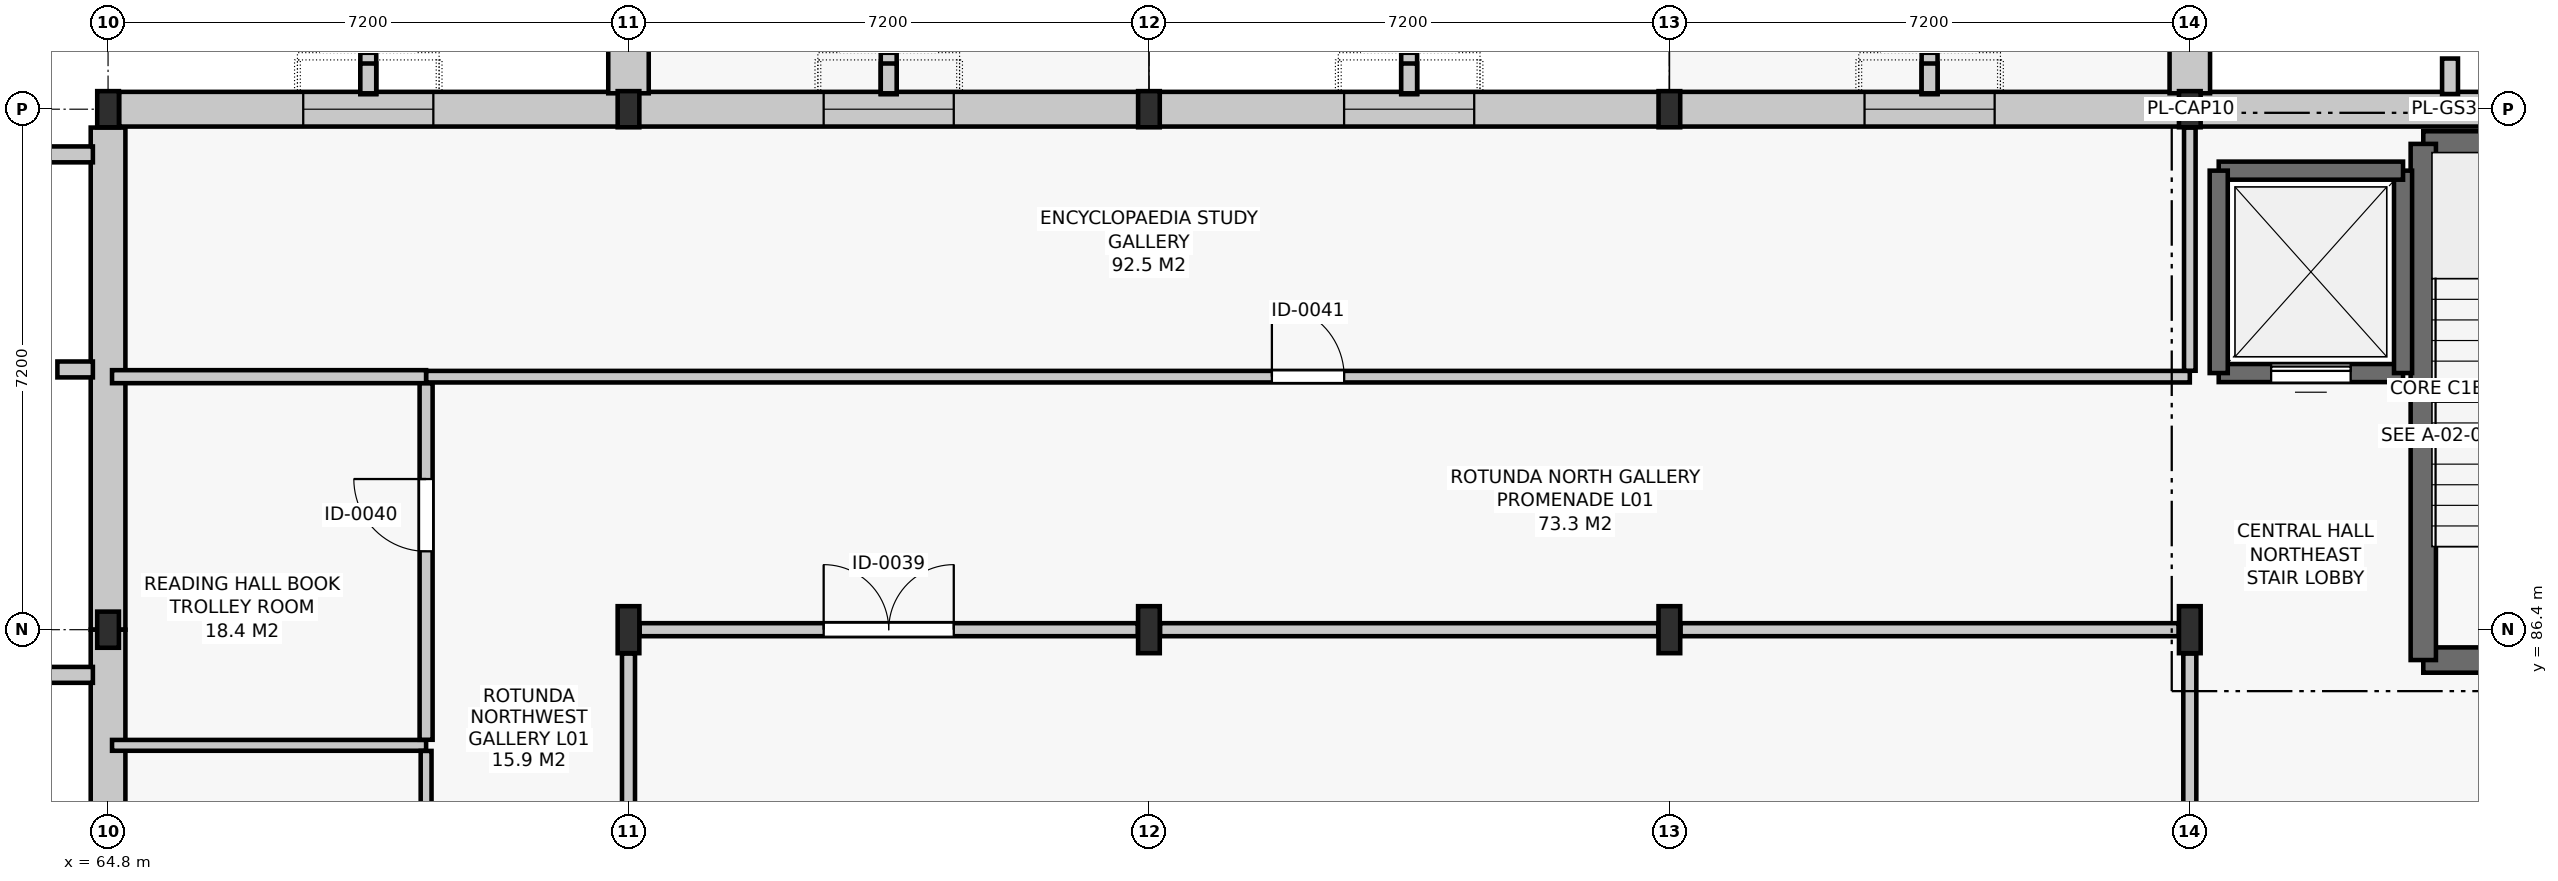
"""IFC4 building model, lengths in metres.
Left out: names, types, materials, properties, quantities, classifications, styles, units other than length and angle.
Written with IfcOpenShell. Run it as: python <this file> out.ifc"""

import sys

from ifc_helpers import new_model, si_unit, direction, frame, frame_2d, origin, origin_2d, place, context, subcontext, project, spatial, rectangle, i_section, extrude, element, fill, save


model = new_model("IFC4")
c1 = context("Model", 3, precision=1e-05, world=origin(), true_north=direction((0.0, 1.0)))
c2 = subcontext(c1, "Body", "Model", "MODEL_VIEW")
j1 = project(units=[si_unit("LENGTHUNIT", "METRE"), si_unit("PLANEANGLEUNIT", "RADIAN")], contexts=[c1])
p1 = place(None, origin())
s1 = spatial("IfcSite", under=j1, at=p1, CompositionType="ELEMENT")
p2 = place(p1, origin())
s2 = spatial("IfcBuilding", under=s1, at=p2, CompositionType="ELEMENT")
p3 = place(p2, frame((0.0, 0.0, 5.4)))
s3 = spatial("IfcBuildingStorey", under=s2, at=p3, CompositionType="ELEMENT", Elevation=5.4)
for number, where, z_axis, x_axis in (
    (1, (64.8, 86.4, 0.0), (0.0, 0.0, 1.0), (1.0, 0.0, 0.0)),
    (2, (64.8, 93.6, 0.0), (0.0, 0.0, 1.0), (1.0, 0.0, 0.0)),
):
    element("IfcColumn", number, at=place(p3, frame(where, z_axis=z_axis, x_axis=x_axis)), inside=s3, PredefinedType="COLUMN", context=c2, shape_type="SweptSolid", body=[
        extrude(i_section(OverallWidth=0.3, OverallDepth=0.5, WebThickness=0.014, FlangeThickness=0.028, FilletRadius=0.027, at=origin_2d()), origin(), (0.0, 0.0, 1.0), 4.8),
    ])
p4 = place(p3, frame((72.0, 86.4, 0.0), z_axis=(0.0, 0.0, 1.0), x_axis=(1.0, 0.0, 0.0)))
e3 = element("IfcColumn", 3, at=p4, inside=s3, PredefinedType="COLUMN", context=c2, shape_type="SweptSolid", body=[
    extrude(i_section(OverallWidth=0.3, OverallDepth=0.65, WebThickness=0.016, FlangeThickness=0.031, FilletRadius=0.027, at=origin_2d()), origin(), (0.0, 0.0, 1.0), 4.8),
])
p5 = place(p3, frame((72.0, 93.6, 0.0), z_axis=(0.0, 0.0, 1.0), x_axis=(1.0, 0.0, 0.0)))
e4 = element("IfcColumn", 4, at=p5, inside=s3, PredefinedType="COLUMN", context=c2, shape_type="SweptSolid", body=[
    extrude(i_section(OverallWidth=0.3, OverallDepth=0.5, WebThickness=0.014, FlangeThickness=0.028, FilletRadius=0.027, at=origin_2d()), origin(), (0.0, 0.0, 1.0), 4.8),
])
p6 = place(p3, frame((79.2, 86.4, 0.0), z_axis=(0.0, 0.0, 1.0), x_axis=(1.0, 0.0, 0.0)))
e5 = element("IfcColumn", 5, at=p6, inside=s3, PredefinedType="COLUMN", context=c2, shape_type="SweptSolid", body=[
    extrude(i_section(OverallWidth=0.3, OverallDepth=0.65, WebThickness=0.016, FlangeThickness=0.031, FilletRadius=0.027, at=origin_2d()), origin(), (0.0, 0.0, 1.0), 4.8),
])
p7 = place(p3, frame((79.2, 93.6, 0.0), z_axis=(0.0, 0.0, 1.0), x_axis=(1.0, 0.0, 0.0)))
e6 = element("IfcColumn", 6, at=p7, inside=s3, PredefinedType="COLUMN", context=c2, shape_type="SweptSolid", body=[
    extrude(i_section(OverallWidth=0.3, OverallDepth=0.5, WebThickness=0.014, FlangeThickness=0.028, FilletRadius=0.027, at=origin_2d()), origin(), (0.0, 0.0, 1.0), 4.8),
])
p8 = place(p3, frame((86.4, 86.4, 0.0), z_axis=(0.0, 0.0, 1.0), x_axis=(1.0, 0.0, 0.0)))
e7 = element("IfcColumn", 7, at=p8, inside=s3, PredefinedType="COLUMN", context=c2, shape_type="SweptSolid", body=[
    extrude(i_section(OverallWidth=0.3, OverallDepth=0.65, WebThickness=0.016, FlangeThickness=0.031, FilletRadius=0.027, at=origin_2d()), origin(), (0.0, 0.0, 1.0), 4.8),
])
p9 = place(p3, frame((86.4, 93.6, 0.0), z_axis=(0.0, 0.0, 1.0), x_axis=(1.0, 0.0, 0.0)))
e8 = element("IfcColumn", 8, at=p9, inside=s3, PredefinedType="COLUMN", context=c2, shape_type="SweptSolid", body=[
    extrude(i_section(OverallWidth=0.3, OverallDepth=0.5, WebThickness=0.014, FlangeThickness=0.028, FilletRadius=0.027, at=origin_2d()), origin(), (0.0, 0.0, 1.0), 4.8),
])
p10 = place(p3, frame((93.6, 86.4, 0.0), z_axis=(0.0, 0.0, 1.0), x_axis=(1.0, 0.0, 0.0)))
e9 = element("IfcColumn", 9, at=p10, inside=s3, PredefinedType="COLUMN", context=c2, shape_type="SweptSolid", body=[
    extrude(i_section(OverallWidth=0.3, OverallDepth=0.65, WebThickness=0.016, FlangeThickness=0.031, FilletRadius=0.027, at=origin_2d()), origin(), (0.0, 0.0, 1.0), 4.8),
])
p11 = place(p3, frame((93.6, 93.6, 0.0), z_axis=(0.0, 0.0, 1.0), x_axis=(1.0, 0.0, 0.0)))
e10 = element("IfcColumn", 10, at=p11, inside=s3, PredefinedType="COLUMN", context=c2, shape_type="SweptSolid", body=[
    extrude(i_section(OverallWidth=0.3, OverallDepth=0.5, WebThickness=0.014, FlangeThickness=0.028, FilletRadius=0.027, at=origin_2d()), origin(), (0.0, 0.0, 1.0), 4.8),
])
p12 = place(p3, frame((100.646, 93.6, 0.0), z_axis=(0.0, 0.0, 1.0), x_axis=(-1.0, 0.0, 0.0)))
e11 = element("IfcWall", 11, at=p12, inside=s3, PredefinedType="SOLIDWALL", context=c2, shape_type="SweptSolid", body=[
    extrude(rectangle(XDim=7.046, YDim=0.48, at=frame_2d((3.523, 0.0))), origin(), (0.0, 0.0, 1.0), 3.8),
])
p13 = place(p3, frame((93.6, 93.6, 0.0), z_axis=(0.0, 0.0, 1.0), x_axis=(-1.0, 0.0, 0.0)))
e12 = element("IfcWall", 12, at=p13, inside=s3, PredefinedType="SOLIDWALL", context=c2, shape_type="SweptSolid", body=[
    extrude(rectangle(XDim=7.2, YDim=0.48, at=frame_2d((3.6, 0.0))), origin(), (0.0, 0.0, 1.0), 3.8),
])
p14 = place(p13, frame((2.7, 0.0, 0.9)))
e13 = element("IfcOpeningElement", 13, at=p14, cuts=e12, PredefinedType="OPENING", context=c2, shape_type="SweptSolid", body=[
    extrude(rectangle(XDim=1.8, YDim=2.45, at=frame_2d((0.9, 1.225))), frame((0.0, 0.252, 0.0), z_axis=(0.0, -1.0, 0.0), x_axis=(1.0, 0.0, 0.0)), (0.0, 0.0, 1.0), 0.504),
])
p15 = place(p3, frame((86.4, 93.6, 0.0), z_axis=(0.0, 0.0, 1.0), x_axis=(-1.0, 0.0, 0.0)))
e14 = element("IfcWall", 14, at=p15, inside=s3, PredefinedType="SOLIDWALL", context=c2, shape_type="SweptSolid", body=[
    extrude(rectangle(XDim=7.2, YDim=0.48, at=frame_2d((3.6, 0.0))), origin(), (0.0, 0.0, 1.0), 3.8),
])
p16 = place(p15, frame((2.7, 0.0, 0.9)))
e15 = element("IfcOpeningElement", 15, at=p16, cuts=e14, PredefinedType="OPENING", context=c2, shape_type="SweptSolid", body=[
    extrude(rectangle(XDim=1.8, YDim=2.45, at=frame_2d((0.9, 1.225))), frame((0.0, 0.252, 0.0), z_axis=(0.0, -1.0, 0.0), x_axis=(1.0, 0.0, 0.0)), (0.0, 0.0, 1.0), 0.504),
])
p17 = place(p3, frame((79.2, 93.6, 0.0), z_axis=(0.0, 0.0, 1.0), x_axis=(-1.0, 0.0, 0.0)))
e16 = element("IfcWall", 16, at=p17, inside=s3, PredefinedType="SOLIDWALL", context=c2, shape_type="SweptSolid", body=[
    extrude(rectangle(XDim=7.2, YDim=0.48, at=frame_2d((3.6, 0.0))), origin(), (0.0, 0.0, 1.0), 3.8),
])
p18 = place(p17, frame((2.7, 0.0, 0.9)))
e17 = element("IfcOpeningElement", 17, at=p18, cuts=e16, PredefinedType="OPENING", context=c2, shape_type="SweptSolid", body=[
    extrude(rectangle(XDim=1.8, YDim=2.45, at=frame_2d((0.9, 1.225))), frame((0.0, 0.252, 0.0), z_axis=(0.0, -1.0, 0.0), x_axis=(1.0, 0.0, 0.0)), (0.0, 0.0, 1.0), 0.504),
])
p19 = place(p3, frame((72.0, 93.6, 0.0), z_axis=(0.0, 0.0, 1.0), x_axis=(-1.0, 0.0, 0.0)))
e18 = element("IfcWall", 18, at=p19, inside=s3, PredefinedType="SOLIDWALL", context=c2, shape_type="SweptSolid", body=[
    extrude(rectangle(XDim=7.046, YDim=0.48, at=frame_2d((3.523, 0.0))), origin(), (0.0, 0.0, 1.0), 3.8),
])
p20 = place(p19, frame((2.7, 0.0, 0.9)))
e19 = element("IfcOpeningElement", 19, at=p20, cuts=e18, PredefinedType="OPENING", context=c2, shape_type="SweptSolid", body=[
    extrude(rectangle(XDim=1.8, YDim=2.45, at=frame_2d((0.9, 1.225))), frame((0.0, 0.252, 0.0), z_axis=(0.0, -1.0, 0.0), x_axis=(1.0, 0.0, 0.0)), (0.0, 0.0, 1.0), 0.504),
])
p21 = place(p3, frame((64.8, 93.346, 0.0), z_axis=(0.0, 0.0, 1.0), x_axis=(0.0, -1.0, 0.0)))
e20 = element("IfcWall", 20, at=p21, inside=s3, PredefinedType="SOLIDWALL", context=c2, shape_type="SweptSolid", body=[
    extrude(rectangle(XDim=6.946, YDim=0.48, at=frame_2d((3.473, 0.0))), origin(), (0.0, 0.0, 1.0), 3.8),
])
p22 = place(p3, frame((64.8, 86.4, 0.0), z_axis=(0.0, 0.0, 1.0), x_axis=(0.0, -1.0, 0.0)))
e21 = element("IfcWall", 21, at=p22, inside=s3, PredefinedType="SOLIDWALL", context=c2, shape_type="SweptSolid", body=[
    extrude(rectangle(XDim=7.2, YDim=0.48, at=frame_2d((3.6, 0.0))), origin(), (0.0, 0.0, 1.0), 3.8),
])
p23 = place(p22, frame((2.7, 0.0, 0.9)))
e22 = element("IfcOpeningElement", 22, at=p23, cuts=e21, PredefinedType="OPENING", context=c2, shape_type="SweptSolid", body=[
    extrude(rectangle(XDim=1.8, YDim=2.45, at=frame_2d((0.9, 1.225))), frame((0.0, 0.252, 0.0), z_axis=(0.0, -1.0, 0.0), x_axis=(1.0, 0.0, 0.0)), (0.0, 0.0, 1.0), 0.504),
])
for number, where, z_axis, x_axis in (
    (23, (72.0, 93.82, 0.0), (0.0, 0.0, 1.0), (0.0, 1.0, 0.0)),
    (24, (93.6, 93.82, 0.0), (0.0, 0.0, 1.0), (0.0, 1.0, 0.0)),
):
    element("IfcWall", number, at=place(p3, frame(where, z_axis=z_axis, x_axis=x_axis)), inside=s3, PredefinedType="SOLIDWALL", context=c2, shape_type="SweptSolid", body=[
        extrude(rectangle(XDim=6.7, YDim=0.56, at=frame_2d((3.35, 0.0))), origin(), (0.0, 0.0, 1.0), 4.05),
    ])
p24 = place(p3, frame((96.83, 85.98, 0.0), z_axis=(0.0, 0.0, 1.0), x_axis=(1.0, 0.0, 0.0)))
e25 = element("IfcWall", 25, at=p24, inside=s3, PredefinedType="SHEAR", context=c2, shape_type="SweptSolid", body=[
    extrude(rectangle(XDim=3.44, YDim=0.35, at=frame_2d((1.72, 0.0))), origin(), (0.0, 0.0, 1.0), 4.52),
])
p25 = place(p24, frame((1.17, 0.0, 0.0)))
e26 = element("IfcOpeningElement", 26, at=p25, cuts=e25, PredefinedType="OPENING", context=c2, shape_type="SweptSolid", body=[
    extrude(rectangle(XDim=1.1, YDim=2.15, at=frame_2d((0.55, 1.075))), frame((0.0, 0.187, 0.0), z_axis=(0.0, -1.0, 0.0), x_axis=(1.0, 0.0, 0.0)), (0.0, 0.0, 1.0), 0.374),
])
p26 = place(p3, frame((100.27, 93.12, 0.0), z_axis=(0.0, 0.0, 1.0), x_axis=(-1.0, 0.0, 0.0)))
e27 = element("IfcWall", 27, at=p26, inside=s3, PredefinedType="SHEAR", context=c2, shape_type="SweptSolid", body=[
    extrude(rectangle(XDim=3.44, YDim=0.35, at=frame_2d((1.72, 0.0))), origin(), (0.0, 0.0, 1.0), 4.52),
])
p27 = place(p3, frame((96.83, 93.12, 0.0), z_axis=(0.0, 0.0, 1.0), x_axis=(0.0, -1.0, 0.0)))
e28 = element("IfcWall", 28, at=p27, inside=s3, PredefinedType="SHEAR", context=c2, shape_type="SweptSolid", body=[
    extrude(rectangle(XDim=7.14, YDim=0.35, at=frame_2d((3.57, 0.0))), origin(), (0.0, 0.0, 1.0), 4.52),
])
p28 = place(p3, frame((94.0, 89.95, 0.0), z_axis=(0.0, 0.0, 1.0), x_axis=(1.0, 0.0, 0.0)))
e29 = element("IfcWall", 29, at=p28, inside=s3, PredefinedType="SHEAR", context=c2, shape_type="SweptSolid", body=[
    extrude(rectangle(XDim=2.55, YDim=0.25, at=frame_2d((1.275, 0.0))), origin(), (0.0, 0.0, 1.0), 4.52),
])
p29 = place(p28, frame((0.725, 0.0, 0.0)))
e30 = element("IfcOpeningElement", 30, at=p29, cuts=e29, PredefinedType="OPENING", context=c2, shape_type="SweptSolid", body=[
    extrude(rectangle(XDim=1.1, YDim=2.1, at=frame_2d((0.55, 1.05))), frame((0.0, 0.137, 0.0), z_axis=(0.0, -1.0, 0.0), x_axis=(1.0, 0.0, 0.0)), (0.0, 0.0, 1.0), 0.274),
])
p30 = place(p3, frame((96.55, 89.95, 0.0), z_axis=(0.0, 0.0, 1.0), x_axis=(0.0, 1.0, 0.0)))
e31 = element("IfcWall", 31, at=p30, inside=s3, PredefinedType="SHEAR", context=c2, shape_type="SweptSolid", body=[
    extrude(rectangle(XDim=2.8, YDim=0.25, at=frame_2d((1.4, 0.0))), origin(), (0.0, 0.0, 1.0), 4.52),
])
p31 = place(p3, frame((96.55, 92.75, 0.0), z_axis=(0.0, 0.0, 1.0), x_axis=(-1.0, 0.0, 0.0)))
e32 = element("IfcWall", 32, at=p31, inside=s3, PredefinedType="SHEAR", context=c2, shape_type="SweptSolid", body=[
    extrude(rectangle(XDim=2.55, YDim=0.25, at=frame_2d((1.275, 0.0))), origin(), (0.0, 0.0, 1.0), 4.52),
])
p32 = place(p3, frame((94.0, 92.75, 0.0), z_axis=(0.0, 0.0, 1.0), x_axis=(0.0, -1.0, 0.0)))
e33 = element("IfcWall", 33, at=p32, inside=s3, PredefinedType="SHEAR", context=c2, shape_type="SweptSolid", body=[
    extrude(rectangle(XDim=2.8, YDim=0.25, at=frame_2d((1.4, 0.0))), origin(), (0.0, 0.0, 1.0), 4.52),
])
p33 = place(p3, frame((64.855, 84.8, 0.0), z_axis=(0.0, 0.0, 1.0), x_axis=(1.0, 0.0, 0.0)))
e34 = element("IfcWall", 34, at=p33, inside=s3, PredefinedType="PARTITIONING", context=c2, shape_type="SweptSolid", body=[
    extrude(rectangle(XDim=4.345, YDim=0.15, at=frame_2d((2.172, 0.0))), origin(), (0.0, 0.0, 1.0), 3.955),
])
p34 = place(p3, frame((72.154, 86.4, 0.0), z_axis=(0.0, 0.0, 1.0), x_axis=(1.0, 0.0, 0.0)))
e35 = element("IfcWall", 35, at=p34, inside=s3, PredefinedType="PARTITIONING", context=c2, shape_type="SweptSolid", body=[
    extrude(rectangle(XDim=6.892, YDim=0.18, at=frame_2d((3.446, 0.0))), origin(), (0.0, 0.0, 1.0), 4.505),
])
p35 = place(p34, frame((2.546, 0.0, 0.0)))
e36 = element("IfcOpeningElement", 36, at=p35, cuts=e35, PredefinedType="OPENING", context=c2, shape_type="SweptSolid", body=[
    extrude(rectangle(XDim=1.8, YDim=2.35, at=frame_2d((0.9, 1.175))), frame((0.0, 0.102, 0.0), z_axis=(0.0, -1.0, 0.0), x_axis=(1.0, 0.0, 0.0)), (0.0, 0.0, 1.0), 0.204),
])
for number, where, z_axis, x_axis in (
    (37, (79.354, 86.4, 0.0), (0.0, 0.0, 1.0), (1.0, 0.0, 0.0)),
    (38, (86.554, 86.4, 0.0), (0.0, 0.0, 1.0), (1.0, 0.0, 0.0)),
):
    element("IfcWall", number, at=place(p3, frame(where, z_axis=z_axis, x_axis=x_axis)), inside=s3, PredefinedType="PARTITIONING", context=c2, shape_type="SweptSolid", body=[
        extrude(rectangle(XDim=6.892, YDim=0.18, at=frame_2d((3.446, 0.0))), origin(), (0.0, 0.0, 1.0), 4.505),
    ])
p36 = place(p3, frame((64.855, 89.9, 0.0), z_axis=(0.0, 0.0, 1.0), x_axis=(1.0, 0.0, 0.0)))
e39 = element("IfcWall", 39, at=p36, inside=s3, PredefinedType="PARTITIONING", context=c2, shape_type="SweptSolid", body=[
    extrude(rectangle(XDim=4.345, YDim=0.18, at=frame_2d((2.172, 0.0))), origin(), (0.0, 0.0, 1.0), 3.955),
])
p37 = place(p3, frame((69.202, 89.9, 0.0), z_axis=(0.0, 0.0, 1.0), x_axis=(1.0, 0.0, 0.0)))
e40 = element("IfcWall", 40, at=p37, inside=s3, PredefinedType="PARTITIONING", context=c2, shape_type="SweptSolid", body=[
    extrude(rectangle(XDim=24.398, YDim=0.16, at=frame_2d((12.199, 0.0))), origin(), (0.0, 0.0, 1.0), 4.065),
])
p38 = place(p37, frame((11.699, 0.0, 0.0)))
e41 = element("IfcOpeningElement", 41, at=p38, cuts=e40, PredefinedType="OPENING", context=c2, shape_type="SweptSolid", body=[
    extrude(rectangle(XDim=1.0, YDim=2.15, at=frame_2d((0.5, 1.075))), frame((0.0, 0.092, 0.0), z_axis=(0.0, -1.0, 0.0), x_axis=(1.0, 0.0, 0.0)), (0.0, 0.0, 1.0), 0.184),
])
p39 = place(p3, frame((69.2, 79.277, 0.0), z_axis=(0.0, 0.0, 1.0), x_axis=(0.0, 1.0, 0.0)))
e42 = element("IfcWall", 42, at=p39, inside=s3, PredefinedType="PARTITIONING", context=c2, shape_type="SweptSolid", body=[
    extrude(rectangle(XDim=5.446, YDim=0.15, at=frame_2d((2.723, 0.0))), origin(), (0.0, 0.0, 1.0), 4.055),
])
p40 = place(p39, frame((2.233, 0.0, 0.0)))
e43 = element("IfcOpeningElement", 43, at=p40, cuts=e42, PredefinedType="OPENING", context=c2, shape_type="SweptSolid", body=[
    extrude(rectangle(XDim=0.98, YDim=2.1, at=frame_2d((0.49, 1.05))), frame((0.0, 0.087, 0.0), z_axis=(0.0, -1.0, 0.0), x_axis=(1.0, 0.0, 0.0)), (0.0, 0.0, 1.0), 0.174),
])
for number, where, z_axis, x_axis in (
    (44, (72.0, 79.529, 0.0), (0.0, 0.0, 1.0), (0.0, 1.0, 0.0)),
    (45, (93.6, 79.529, 0.0), (0.0, 0.0, 1.0), (0.0, 1.0, 0.0)),
):
    element("IfcWall", number, at=place(p3, frame(where, z_axis=z_axis, x_axis=x_axis)), inside=s3, PredefinedType="PARTITIONING", context=c2, shape_type="SweptSolid", body=[
        extrude(rectangle(XDim=6.542, YDim=0.18, at=frame_2d((3.271, 0.0))), origin(), (0.0, 0.0, 1.0), 4.505),
    ])
p41 = place(p3, frame((69.2, 84.877, 0.0), z_axis=(0.0, 0.0, 1.0), x_axis=(0.0, 1.0, 0.0)))
e46 = element("IfcWall", 46, at=p41, inside=s3, PredefinedType="PARTITIONING", context=c2, shape_type="SweptSolid", body=[
    extrude(rectangle(XDim=4.931, YDim=0.18, at=frame_2d((2.466, 0.0))), origin(), (0.0, 0.0, 1.0), 4.055),
])
p42 = place(p41, frame((2.607, 0.0, 0.0)))
e47 = element("IfcOpeningElement", 47, at=p42, cuts=e46, PredefinedType="OPENING", context=c2, shape_type="SweptSolid", body=[
    extrude(rectangle(XDim=1.0, YDim=2.15, at=frame_2d((0.5, 1.075))), frame((0.0, 0.102, 0.0), z_axis=(0.0, -1.0, 0.0), x_axis=(1.0, 0.0, 0.0)), (0.0, 0.0, 1.0), 0.204),
])
p43 = place(p3, frame((93.6, 89.982, 0.0), z_axis=(0.0, 0.0, 1.0), x_axis=(0.0, 1.0, 0.0)))
e48 = element("IfcWall", 48, at=p43, inside=s3, PredefinedType="PARTITIONING", context=c2, shape_type="SweptSolid", body=[
    extrude(rectangle(XDim=3.364, YDim=0.16, at=frame_2d((1.682, 0.0))), origin(), (0.0, 0.0, 1.0), 4.065),
])
p44 = place(p14, origin())
e49 = element("IfcWindow", 49, at=p44, inside=s3, PartitioningType="SINGLE_PANEL", PredefinedType="WINDOW", context=c2, shape_type="SweptSolid", body=[
    extrude(rectangle(XDim=1.8, YDim=2.45, at=frame_2d((0.9, 1.225))), frame((0.0, 0.03, 0.0), z_axis=(0.0, -1.0, 0.0), x_axis=(1.0, 0.0, 0.0)), (0.0, 0.0, 1.0), 0.06),
])
fill(e13, e49)
p45 = place(p16, origin())
e50 = element("IfcWindow", 50, at=p45, inside=s3, PartitioningType="SINGLE_PANEL", PredefinedType="WINDOW", context=c2, shape_type="SweptSolid", body=[
    extrude(rectangle(XDim=1.8, YDim=2.45, at=frame_2d((0.9, 1.225))), frame((0.0, 0.03, 0.0), z_axis=(0.0, -1.0, 0.0), x_axis=(1.0, 0.0, 0.0)), (0.0, 0.0, 1.0), 0.06),
])
fill(e15, e50)
p46 = place(p18, origin())
e51 = element("IfcWindow", 51, at=p46, inside=s3, PartitioningType="SINGLE_PANEL", PredefinedType="WINDOW", context=c2, shape_type="SweptSolid", body=[
    extrude(rectangle(XDim=1.8, YDim=2.45, at=frame_2d((0.9, 1.225))), frame((0.0, 0.03, 0.0), z_axis=(0.0, -1.0, 0.0), x_axis=(1.0, 0.0, 0.0)), (0.0, 0.0, 1.0), 0.06),
])
fill(e17, e51)
p47 = place(p20, origin())
e52 = element("IfcWindow", 52, at=p47, inside=s3, PartitioningType="SINGLE_PANEL", PredefinedType="WINDOW", context=c2, shape_type="SweptSolid", body=[
    extrude(rectangle(XDim=1.8, YDim=2.45, at=frame_2d((0.9, 1.225))), frame((0.0, 0.03, 0.0), z_axis=(0.0, -1.0, 0.0), x_axis=(1.0, 0.0, 0.0)), (0.0, 0.0, 1.0), 0.06),
])
fill(e19, e52)
p48 = place(p29, origin())
e53 = element("IfcDoor", 53, at=p48, inside=s3, OperationType="SLIDING_TO_LEFT", PredefinedType="DOOR", context=c2, shape_type="SweptSolid", body=[
    extrude(rectangle(XDim=1.1, YDim=2.1, at=frame_2d((0.55, 1.05))), frame((0.0, 0.025, 0.0), z_axis=(0.0, -1.0, 0.0), x_axis=(1.0, 0.0, 0.0)), (0.0, 0.0, 1.0), 0.05),
])
fill(e30, e53)
p49 = place(p35, origin())
e54 = element("IfcDoor", 54, at=p49, inside=s3, OperationType="DOUBLE_DOOR_SINGLE_SWING", PredefinedType="DOOR", context=c2, shape_type="SweptSolid", body=[
    extrude(rectangle(XDim=1.8, YDim=2.35, at=frame_2d((0.9, 1.175))), frame((0.0, 0.025, 0.0), z_axis=(0.0, -1.0, 0.0), x_axis=(1.0, 0.0, 0.0)), (0.0, 0.0, 1.0), 0.05),
])
fill(e36, e54)
p50 = place(p42, origin())
e55 = element("IfcDoor", 55, at=p50, inside=s3, OperationType="SINGLE_SWING_RIGHT", PredefinedType="DOOR", context=c2, shape_type="SweptSolid", body=[
    extrude(rectangle(XDim=1.0, YDim=2.15, at=frame_2d((0.5, 1.075))), frame((0.0, 0.025, 0.0), z_axis=(0.0, -1.0, 0.0), x_axis=(1.0, 0.0, 0.0)), (0.0, 0.0, 1.0), 0.05),
])
fill(e47, e55)
p51 = place(p38, origin())
e56 = element("IfcDoor", 56, at=p51, inside=s3, OperationType="SINGLE_SWING_LEFT", PredefinedType="DOOR", context=c2, shape_type="SweptSolid", body=[
    extrude(rectangle(XDim=1.0, YDim=2.15, at=frame_2d((0.5, 1.075))), frame((0.0, 0.025, 0.0), z_axis=(0.0, -1.0, 0.0), x_axis=(1.0, 0.0, 0.0)), (0.0, 0.0, 1.0), 0.05),
])
fill(e41, e56)
save(model, sys.argv[1])
